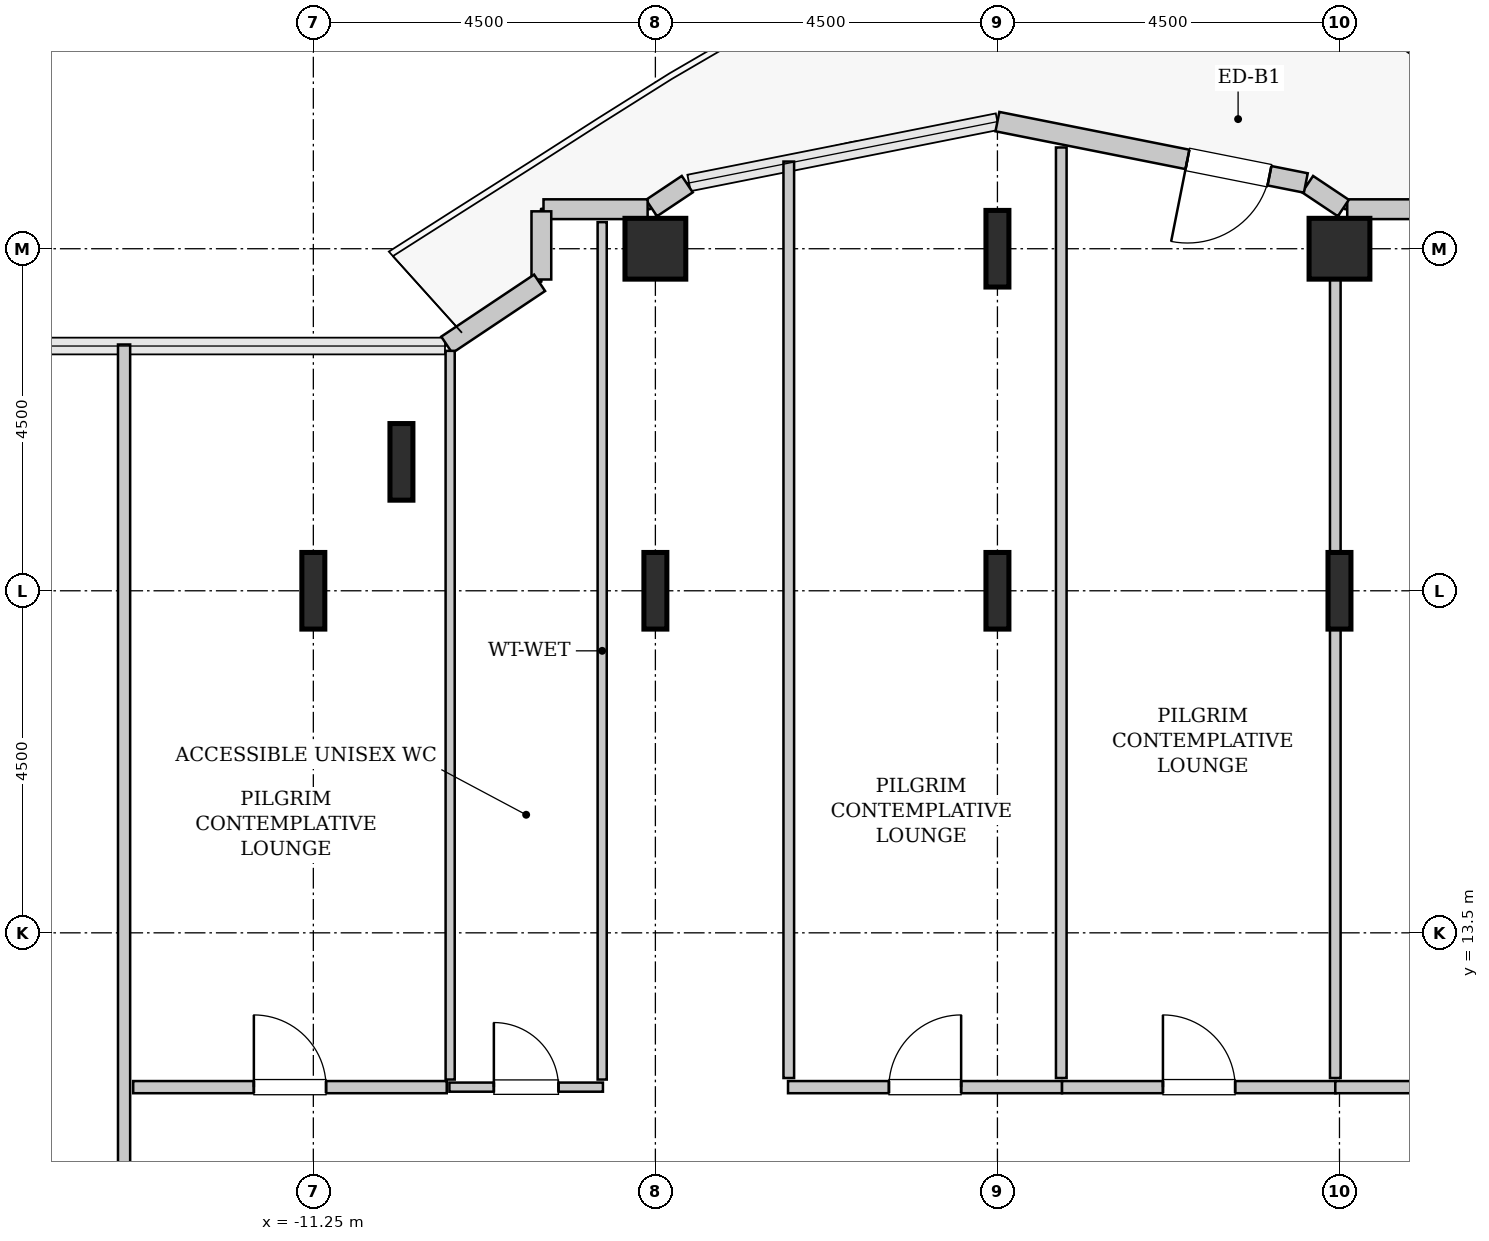
"""IFC4 building model, lengths in metres.
Left out: names, types, materials, properties, quantities, classifications, styles, units other than length and angle.
Written with IfcOpenShell. Run it as: python <this file> out.ifc"""

import sys

from ifc_helpers import new_model, si_unit, direction, frame, frame_2d, origin, origin_2d, place, context, subcontext, project, spatial, rectangle, hollow_rectangle, i_section, extrude, source, transform, mapped, element, fill, save


model = new_model("IFC4")
c1 = context("Model", 3, precision=1e-05, world=origin(), true_north=direction((0.0, 1.0)))
c2 = subcontext(c1, "Body", "Model", "MODEL_VIEW")
j1 = project(units=[si_unit("LENGTHUNIT", "METRE"), si_unit("PLANEANGLEUNIT", "RADIAN")], contexts=[c1])
p1 = place(None, origin())
s1 = spatial("IfcSite", under=j1, at=p1, CompositionType="ELEMENT")
p2 = place(p1, origin())
s2 = spatial("IfcBuilding", under=s1, at=p2, CompositionType="ELEMENT")
p3 = place(p2, frame((0.0, 0.0, 125.0)))
s3 = spatial("IfcBuildingStorey", under=s2, at=p3, CompositionType="ELEMENT", Elevation=125.0)
m1 = source(origin(), c2, "Body", "SweptSolid", [
    extrude(i_section(OverallWidth=0.302, OverallDepth=1.008, WebThickness=0.021, FlangeThickness=0.04, FilletRadius=0.03, at=origin_2d()), origin(), (0.0, 0.0, 1.0), 3.8),
])
for number, where, z_axis, x_axis in (
    (1, (-11.25, 18.0, 0.0), (0.0, 0.0, 1.0), (1.0, 0.0, 0.0)),
    (2, (-10.091, 19.696, 0.0), (0.0, 0.0, 1.0), (1.0, 0.0, 0.0)),
    (3, (-6.75, 18.0, 0.0), (0.0, 0.0, 1.0), (1.0, 0.0, 0.0)),
):
    element("IfcColumn", number, at=place(p3, frame(where, z_axis=z_axis, x_axis=x_axis)), inside=s3, PredefinedType="COLUMN", context=c2, shape_type="MappedRepresentation", body=[
        mapped(m1, transform((0.0, 0.0, 0.0), x_axis=(1.0, 0.0, 0.0), y_axis=(0.0, 1.0, 0.0), z_axis=(0.0, 0.0, 1.0), scale=1.0)),
    ])
m2 = source(origin(), c2, "Body", "SweptSolid", [
    extrude(hollow_rectangle(XDim=0.8, YDim=0.8, WallThickness=0.04, InnerFilletRadius=0.04, OuterFilletRadius=0.08, at=origin_2d()), origin(), (0.0, 0.0, 1.0), 3.8),
])
p4 = place(p3, frame((-6.75, 22.5, 0.0), z_axis=(0.0, 0.0, 1.0), x_axis=(1.0, 0.0, 0.0)))
e4 = element("IfcColumn", 4, at=p4, inside=s3, PredefinedType="COLUMN", context=c2, shape_type="MappedRepresentation", body=[
    mapped(m2, transform((0.0, 0.0, 0.0), x_axis=(1.0, 0.0, 0.0), y_axis=(0.0, 1.0, 0.0), z_axis=(0.0, 0.0, 1.0), scale=1.0)),
])
for number, where, z_axis, x_axis in (
    (5, (-2.25, 18.0, 0.0), (0.0, 0.0, 1.0), (1.0, 0.0, 0.0)),
    (6, (-2.25, 22.5, 0.0), (0.0, 0.0, 1.0), (1.0, 0.0, 0.0)),
    (7, (2.25, 18.0, 0.0), (0.0, 0.0, 1.0), (1.0, 0.0, 0.0)),
):
    element("IfcColumn", number, at=place(p3, frame(where, z_axis=z_axis, x_axis=x_axis)), inside=s3, PredefinedType="COLUMN", context=c2, shape_type="MappedRepresentation", body=[
        mapped(m1, transform((0.0, 0.0, 0.0), x_axis=(1.0, 0.0, 0.0), y_axis=(0.0, 1.0, 0.0), z_axis=(0.0, 0.0, 1.0), scale=1.0)),
    ])
p5 = place(p3, frame((2.25, 22.5, 0.0), z_axis=(0.0, 0.0, 1.0), x_axis=(1.0, 0.0, 0.0)))
e8 = element("IfcColumn", 8, at=p5, inside=s3, PredefinedType="COLUMN", context=c2, shape_type="MappedRepresentation", body=[
    mapped(m2, transform((0.0, 0.0, 0.0), x_axis=(1.0, 0.0, 0.0), y_axis=(0.0, 1.0, 0.0), z_axis=(0.0, 0.0, 1.0), scale=1.0)),
])
m3 = source(origin(), c2, "Body", "SweptSolid", [
    extrude(rectangle(XDim=1.37, YDim=0.26, at=frame_2d((0.685, 0.0))), origin(), (0.0, 0.0, 1.0), 3.55),
])
p6 = place(p3, frame((3.722, 23.02, 0.0), z_axis=(0.0, 0.0, 1.0), x_axis=(-1.0, 0.0, 0.0)))
e9 = element("IfcWall", 9, at=p6, inside=s3, PredefinedType="SOLIDWALL", context=c2, shape_type="MappedRepresentation", body=[
    mapped(m3, transform((0.0, 0.0, 0.0), x_axis=(1.0, 0.0, 0.0), y_axis=(0.0, 1.0, 0.0), z_axis=(0.0, 0.0, 1.0), scale=1.0)),
])
m4 = source(origin(), c2, "Body", "SweptSolid", [
    extrude(rectangle(XDim=0.565, YDim=0.26, at=frame_2d((0.283, 0.0))), origin(), (0.0, 0.0, 1.0), 3.55),
])
p7 = place(p3, frame((2.301, 23.036, 0.0), z_axis=(0.0, 0.0, 1.0), x_axis=(-0.831651492666, 0.555297933317, 0.0)))
e10 = element("IfcWall", 10, at=p7, inside=s3, PredefinedType="SOLIDWALL", context=c2, shape_type="MappedRepresentation", body=[
    mapped(m4, transform((0.0, 0.0, 0.0), x_axis=(1.0, 0.0, 0.0), y_axis=(0.0, 1.0, 0.0), z_axis=(0.0, 0.0, 1.0), scale=1.0)),
])
m5 = source(origin(), c2, "Body", "SweptSolid", [
    extrude(rectangle(XDim=4.137, YDim=0.26, at=frame_2d((2.068, 0.0))), origin(), (0.0, 0.0, 1.0), 3.55),
])
p8 = place(p3, frame((1.807, 23.365, 0.0), z_axis=(0.0, 0.0, 1.0), x_axis=(-0.980782170794, 0.195105954428, 0.0)))
e11 = element("IfcWall", 11, at=p8, inside=s3, PredefinedType="SOLIDWALL", context=c2, shape_type="MappedRepresentation", body=[
    mapped(m5, transform((0.0, 0.0, 0.0), x_axis=(1.0, 0.0, 0.0), y_axis=(0.0, 1.0, 0.0), z_axis=(0.0, 0.0, 1.0), scale=1.0)),
])
p9 = place(p8, frame((0.488, 0.0, 0.0)))
e12 = element("IfcOpeningElement", 12, at=p9, cuts=e11, PredefinedType="OPENING", context=c2, shape_type="SweptSolid", body=[
    extrude(rectangle(XDim=1.1, YDim=2.2, at=frame_2d((0.55, 1.1))), frame((0.0, 0.14, 0.0), z_axis=(0.0, -1.0, 0.0), x_axis=(1.0, 0.0, 0.0)), (0.0, 0.0, 1.0), 0.28),
])
p10 = place(p3, frame((-6.331, 23.35, 0.0), z_axis=(0.0, 0.0, 1.0), x_axis=(-0.831651492666, -0.555297933317, 0.0)))
e13 = element("IfcWall", 13, at=p10, inside=s3, PredefinedType="SOLIDWALL", context=c2, shape_type="MappedRepresentation", body=[
    mapped(m4, transform((0.0, 0.0, 0.0), x_axis=(1.0, 0.0, 0.0), y_axis=(0.0, 1.0, 0.0), z_axis=(0.0, 0.0, 1.0), scale=1.0)),
])
p11 = place(p3, frame((-6.852, 23.02, 0.0), z_axis=(0.0, 0.0, 1.0), x_axis=(-1.0, 0.0, 0.0)))
e14 = element("IfcWall", 14, at=p11, inside=s3, PredefinedType="SOLIDWALL", context=c2, shape_type="MappedRepresentation", body=[
    mapped(m3, transform((0.0, 0.0, 0.0), x_axis=(1.0, 0.0, 0.0), y_axis=(0.0, 1.0, 0.0), z_axis=(0.0, 0.0, 1.0), scale=1.0)),
])
m6 = source(origin(), c2, "Body", "SweptSolid", [
    extrude(rectangle(XDim=0.897, YDim=0.26, at=frame_2d((0.448, 0.0))), origin(), (0.0, 0.0, 1.0), 3.55),
])
p12 = place(p3, frame((-8.25, 22.992, 0.0), z_axis=(0.0, 0.0, 1.0), x_axis=(0.0, -1.0, 0.0)))
e15 = element("IfcWall", 15, at=p12, inside=s3, PredefinedType="SOLIDWALL", context=c2, shape_type="MappedRepresentation", body=[
    mapped(m6, transform((0.0, 0.0, 0.0), x_axis=(1.0, 0.0, 0.0), y_axis=(0.0, 1.0, 0.0), z_axis=(0.0, 0.0, 1.0), scale=1.0)),
])
m7 = source(origin(), c2, "Body", "SweptSolid", [
    extrude(rectangle(XDim=1.469, YDim=0.26, at=frame_2d((0.734, 0.0))), origin(), (0.0, 0.0, 1.0), 3.55),
])
p13 = place(p3, frame((-8.273, 22.052, 0.0), z_axis=(0.0, 0.0, 1.0), x_axis=(-0.831461760506, -0.555581983884, 0.0)))
e16 = element("IfcWall", 16, at=p13, inside=s3, PredefinedType="SOLIDWALL", context=c2, shape_type="MappedRepresentation", body=[
    mapped(m7, transform((0.0, 0.0, 0.0), x_axis=(1.0, 0.0, 0.0), y_axis=(0.0, 1.0, 0.0), z_axis=(0.0, 0.0, 1.0), scale=1.0)),
])
m8 = source(origin(), c2, "Body", "SweptSolid", [
    extrude(rectangle(XDim=2.02, YDim=0.12, at=frame_2d((1.01, 0.0))), origin(), (0.0, 0.0, 1.0), 3.535),
])
p14 = place(p3, frame((-9.46, 11.47, 0.0), z_axis=(0.0, 0.0, 1.0), x_axis=(1.0, 0.0, 0.0)))
e17 = element("IfcWall", 17, at=p14, inside=s3, PredefinedType="PLUMBINGWALL", context=c2, shape_type="MappedRepresentation", body=[
    mapped(m8, transform((0.0, 0.0, 0.0), x_axis=(1.0, 0.0, 0.0), y_axis=(0.0, 1.0, 0.0), z_axis=(0.0, 0.0, 1.0), scale=1.0)),
])
p15 = place(p14, frame((0.585, 0.0, 0.0)))
e18 = element("IfcOpeningElement", 18, at=p15, cuts=e17, PredefinedType="OPENING", context=c2, shape_type="SweptSolid", body=[
    extrude(rectangle(XDim=0.85, YDim=2.1, at=frame_2d((0.425, 1.05))), frame((0.0, 0.07, 0.0), z_axis=(0.0, -1.0, 0.0), x_axis=(1.0, 0.0, 0.0)), (0.0, 0.0, 1.0), 0.14),
])
m9 = source(origin(), c2, "Body", "SweptSolid", [
    extrude(rectangle(XDim=11.28, YDim=0.12, at=frame_2d((5.64, 0.0))), origin(), (0.0, 0.0, 1.0), 3.535),
])
p16 = place(p3, frame((-7.45, 11.57, 0.0), z_axis=(0.0, 0.0, 1.0), x_axis=(0.0, 1.0, 0.0)))
e19 = element("IfcWall", 19, at=p16, inside=s3, PredefinedType="PLUMBINGWALL", context=c2, shape_type="MappedRepresentation", body=[
    mapped(m9, transform((0.0, 0.0, 0.0), x_axis=(1.0, 0.0, 0.0), y_axis=(0.0, 1.0, 0.0), z_axis=(0.0, 0.0, 1.0), scale=1.0)),
])
m10 = source(origin(), c2, "Body", "SweptSolid", [
    extrude(rectangle(XDim=9.587, YDim=0.12, at=frame_2d((4.793, 0.0))), origin(), (0.0, 0.0, 1.0), 3.535),
])
p17 = place(p3, frame((-9.45, 11.57, 0.0), z_axis=(0.0, 0.0, 1.0), x_axis=(0.0, 1.0, 0.0)))
e20 = element("IfcWall", 20, at=p17, inside=s3, PredefinedType="PLUMBINGWALL", context=c2, shape_type="MappedRepresentation", body=[
    mapped(m10, transform((0.0, 0.0, 0.0), x_axis=(1.0, 0.0, 0.0), y_axis=(0.0, 1.0, 0.0), z_axis=(0.0, 0.0, 1.0), scale=1.0)),
])
m11 = source(origin(), c2, "Body", "SweptSolid", [
    extrude(rectangle(XDim=15.645, YDim=0.16, at=frame_2d((7.823, 0.0))), origin(), (0.0, 0.0, 1.0), 3.535),
])
p18 = place(p3, frame((-13.74, 5.595, 0.0), z_axis=(0.0, 0.0, 1.0), x_axis=(0.0, 1.0, 0.0)))
e21 = element("IfcWall", 21, at=p18, inside=s3, PredefinedType="PARTITIONING", context=c2, shape_type="MappedRepresentation", body=[
    mapped(m11, transform((0.0, 0.0, 0.0), x_axis=(1.0, 0.0, 0.0), y_axis=(0.0, 1.0, 0.0), z_axis=(0.0, 0.0, 1.0), scale=1.0)),
])
p19 = place(p18, frame((2.482, 0.0, 0.0)))
e22 = element("IfcOpeningElement", 22, at=p19, cuts=e21, PredefinedType="OPENING", context=c2, shape_type="SweptSolid", body=[
    extrude(rectangle(XDim=0.95, YDim=2.1, at=frame_2d((0.475, 1.05))), frame((0.0, 0.09, 0.0), z_axis=(0.0, -1.0, 0.0), x_axis=(1.0, 0.0, 0.0)), (0.0, 0.0, 1.0), 0.18),
])
m12 = source(origin(), c2, "Body", "SweptSolid", [
    extrude(rectangle(XDim=4.125, YDim=0.16, at=frame_2d((2.062, 0.0))), origin(), (0.0, 0.0, 1.0), 3.535),
])
p20 = place(p3, frame((-13.62, 11.47, 0.0), z_axis=(0.0, 0.0, 1.0), x_axis=(1.0, 0.0, 0.0)))
e23 = element("IfcWall", 23, at=p20, inside=s3, PredefinedType="PARTITIONING", context=c2, shape_type="MappedRepresentation", body=[
    mapped(m12, transform((0.0, 0.0, 0.0), x_axis=(1.0, 0.0, 0.0), y_axis=(0.0, 1.0, 0.0), z_axis=(0.0, 0.0, 1.0), scale=1.0)),
])
p21 = place(p20, frame((1.587, 0.0, 0.0)))
e24 = element("IfcOpeningElement", 24, at=p21, cuts=e23, PredefinedType="OPENING", context=c2, shape_type="SweptSolid", body=[
    extrude(rectangle(XDim=0.95, YDim=2.1, at=frame_2d((0.475, 1.05))), frame((0.0, 0.09, 0.0), z_axis=(0.0, -1.0, 0.0), x_axis=(1.0, 0.0, 0.0)), (0.0, 0.0, 1.0), 0.18),
])
m13 = source(origin(), c2, "Body", "SweptSolid", [
    extrude(rectangle(XDim=3.605, YDim=0.16, at=frame_2d((1.802, 0.0))), origin(), (0.0, 0.0, 1.0), 3.535),
])
p22 = place(p3, frame((-5.005, 11.47, 0.0), z_axis=(0.0, 0.0, 1.0), x_axis=(1.0, 0.0, 0.0)))
e25 = element("IfcWall", 25, at=p22, inside=s3, PredefinedType="PARTITIONING", context=c2, shape_type="MappedRepresentation", body=[
    mapped(m13, transform((0.0, 0.0, 0.0), x_axis=(1.0, 0.0, 0.0), y_axis=(0.0, 1.0, 0.0), z_axis=(0.0, 0.0, 1.0), scale=1.0)),
])
p23 = place(p22, frame((1.327, 0.0, 0.0)))
e26 = element("IfcOpeningElement", 26, at=p23, cuts=e25, PredefinedType="OPENING", context=c2, shape_type="SweptSolid", body=[
    extrude(rectangle(XDim=0.95, YDim=2.1, at=frame_2d((0.475, 1.05))), frame((0.0, 0.09, 0.0), z_axis=(0.0, -1.0, 0.0), x_axis=(1.0, 0.0, 0.0)), (0.0, 0.0, 1.0), 0.18),
])
m14 = source(origin(), c2, "Body", "SweptSolid", [
    extrude(rectangle(XDim=12.242, YDim=0.14, at=frame_2d((6.121, 0.0))), origin(), (0.0, 0.0, 1.0), 3.535),
])
p24 = place(p3, frame((-1.41, 11.59, 0.0), z_axis=(0.0, 0.0, 1.0), x_axis=(0.0, 1.0, 0.0)))
e27 = element("IfcWall", 27, at=p24, inside=s3, PredefinedType="PARTITIONING", context=c2, shape_type="MappedRepresentation", body=[
    mapped(m14, transform((0.0, 0.0, 0.0), x_axis=(1.0, 0.0, 0.0), y_axis=(0.0, 1.0, 0.0), z_axis=(0.0, 0.0, 1.0), scale=1.0)),
])
m15 = source(origin(), c2, "Body", "SweptSolid", [
    extrude(rectangle(XDim=12.057, YDim=0.14, at=frame_2d((6.028, 0.0))), origin(), (0.0, 0.0, 1.0), 3.535),
])
p25 = place(p3, frame((-4.995, 11.59, 0.0), z_axis=(0.0, 0.0, 1.0), x_axis=(0.0, 1.0, 0.0)))
e28 = element("IfcWall", 28, at=p25, inside=s3, PredefinedType="PARTITIONING", context=c2, shape_type="MappedRepresentation", body=[
    mapped(m15, transform((0.0, 0.0, 0.0), x_axis=(1.0, 0.0, 0.0), y_axis=(0.0, 1.0, 0.0), z_axis=(0.0, 0.0, 1.0), scale=1.0)),
])
p26 = place(p3, frame((-1.4, 11.47, 0.0), z_axis=(0.0, 0.0, 1.0), x_axis=(1.0, 0.0, 0.0)))
e29 = element("IfcWall", 29, at=p26, inside=s3, PredefinedType="PARTITIONING", context=c2, shape_type="MappedRepresentation", body=[
    mapped(m13, transform((0.0, 0.0, 0.0), x_axis=(1.0, 0.0, 0.0), y_axis=(0.0, 1.0, 0.0), z_axis=(0.0, 0.0, 1.0), scale=1.0)),
])
p27 = place(p26, frame((1.327, 0.0, 0.0)))
e30 = element("IfcOpeningElement", 30, at=p27, cuts=e29, PredefinedType="OPENING", context=c2, shape_type="SweptSolid", body=[
    extrude(rectangle(XDim=0.95, YDim=2.1, at=frame_2d((0.475, 1.05))), frame((0.0, 0.09, 0.0), z_axis=(0.0, -1.0, 0.0), x_axis=(1.0, 0.0, 0.0)), (0.0, 0.0, 1.0), 0.18),
])
m16 = source(origin(), c2, "Body", "SweptSolid", [
    extrude(rectangle(XDim=11.314, YDim=0.14, at=frame_2d((5.657, 0.0))), origin(), (0.0, 0.0, 1.0), 2.875),
])
p28 = place(p3, frame((2.195, 11.59, 0.0), z_axis=(0.0, 0.0, 1.0), x_axis=(0.0, 1.0, 0.0)))
e31 = element("IfcWall", 31, at=p28, inside=s3, PredefinedType="PARTITIONING", context=c2, shape_type="MappedRepresentation", body=[
    mapped(m16, transform((0.0, 0.0, 0.0), x_axis=(1.0, 0.0, 0.0), y_axis=(0.0, 1.0, 0.0), z_axis=(0.0, 0.0, 1.0), scale=1.0)),
])
m17 = source(origin(), c2, "Body", "SweptSolid", [
    extrude(rectangle(XDim=6.21, YDim=0.16, at=frame_2d((3.105, 0.0))), origin(), (0.0, 0.0, 1.0), 3.535),
])
p29 = place(p3, frame((2.195, 11.47, 0.0), z_axis=(0.0, 0.0, 1.0), x_axis=(1.0, 0.0, 0.0)))
e32 = element("IfcWall", 32, at=p29, inside=s3, PredefinedType="PARTITIONING", context=c2, shape_type="MappedRepresentation", body=[
    mapped(m17, transform((0.0, 0.0, 0.0), x_axis=(1.0, 0.0, 0.0), y_axis=(0.0, 1.0, 0.0), z_axis=(0.0, 0.0, 1.0), scale=1.0)),
])
p30 = place(p29, frame((2.63, 0.0, 0.0)))
e33 = element("IfcOpeningElement", 33, at=p30, cuts=e32, PredefinedType="OPENING", context=c2, shape_type="SweptSolid", body=[
    extrude(rectangle(XDim=0.95, YDim=2.1, at=frame_2d((0.475, 1.05))), frame((0.0, 0.09, 0.0), z_axis=(0.0, -1.0, 0.0), x_axis=(1.0, 0.0, 0.0)), (0.0, 0.0, 1.0), 0.18),
])
m18 = source(origin(), c2, "Body", "SweptSolid", [
    extrude(rectangle(XDim=1.1, YDim=2.2, at=frame_2d((0.55, 1.1))), frame((0.0, 0.025, 0.0), z_axis=(0.0, -1.0, 0.0), x_axis=(1.0, 0.0, 0.0)), (0.0, 0.0, 1.0), 0.05),
])
p31 = place(p9, origin())
e34 = element("IfcDoor", 34, at=p31, inside=s3, OperationType="SINGLE_SWING_RIGHT", PredefinedType="DOOR", context=c2, shape_type="MappedRepresentation", body=[
    mapped(m18, transform((0.0, 0.0, 0.0), x_axis=(1.0, 0.0, 0.0), y_axis=(0.0, 1.0, 0.0), z_axis=(0.0, 0.0, 1.0), scale=1.0)),
])
fill(e12, e34)
m19 = source(origin(), c2, "Body", "SweptSolid", [
    extrude(rectangle(XDim=0.85, YDim=2.1, at=frame_2d((0.425, 1.05))), frame((0.0, 0.025, 0.0), z_axis=(0.0, -1.0, 0.0), x_axis=(1.0, 0.0, 0.0)), (0.0, 0.0, 1.0), 0.05),
])
p32 = place(p15, origin())
e35 = element("IfcDoor", 35, at=p32, inside=s3, OperationType="SINGLE_SWING_LEFT", PredefinedType="DOOR", context=c2, shape_type="MappedRepresentation", body=[
    mapped(m19, transform((0.0, 0.0, 0.0), x_axis=(1.0, 0.0, 0.0), y_axis=(0.0, 1.0, 0.0), z_axis=(0.0, 0.0, 1.0), scale=1.0)),
])
fill(e18, e35)
m20 = source(origin(), c2, "Body", "SweptSolid", [
    extrude(rectangle(XDim=0.95, YDim=2.1, at=frame_2d((0.475, 1.05))), frame((0.0, 0.025, 0.0), z_axis=(0.0, -1.0, 0.0), x_axis=(1.0, 0.0, 0.0)), (0.0, 0.0, 1.0), 0.05),
])
p33 = place(p21, origin())
e36 = element("IfcDoor", 36, at=p33, inside=s3, OperationType="SINGLE_SWING_LEFT", PredefinedType="DOOR", context=c2, shape_type="MappedRepresentation", body=[
    mapped(m20, transform((0.0, 0.0, 0.0), x_axis=(1.0, 0.0, 0.0), y_axis=(0.0, 1.0, 0.0), z_axis=(0.0, 0.0, 1.0), scale=1.0)),
])
fill(e24, e36)
p34 = place(p23, origin())
e37 = element("IfcDoor", 37, at=p34, inside=s3, OperationType="SINGLE_SWING_RIGHT", PredefinedType="DOOR", context=c2, shape_type="MappedRepresentation", body=[
    mapped(m20, transform((0.0, 0.0, 0.0), x_axis=(1.0, 0.0, 0.0), y_axis=(0.0, 1.0, 0.0), z_axis=(0.0, 0.0, 1.0), scale=1.0)),
])
fill(e26, e37)
p35 = place(p27, origin())
e38 = element("IfcDoor", 38, at=p35, inside=s3, OperationType="SINGLE_SWING_LEFT", PredefinedType="DOOR", context=c2, shape_type="MappedRepresentation", body=[
    mapped(m20, transform((0.0, 0.0, 0.0), x_axis=(1.0, 0.0, 0.0), y_axis=(0.0, 1.0, 0.0), z_axis=(0.0, 0.0, 1.0), scale=1.0)),
])
fill(e30, e38)
save(model, sys.argv[1])
